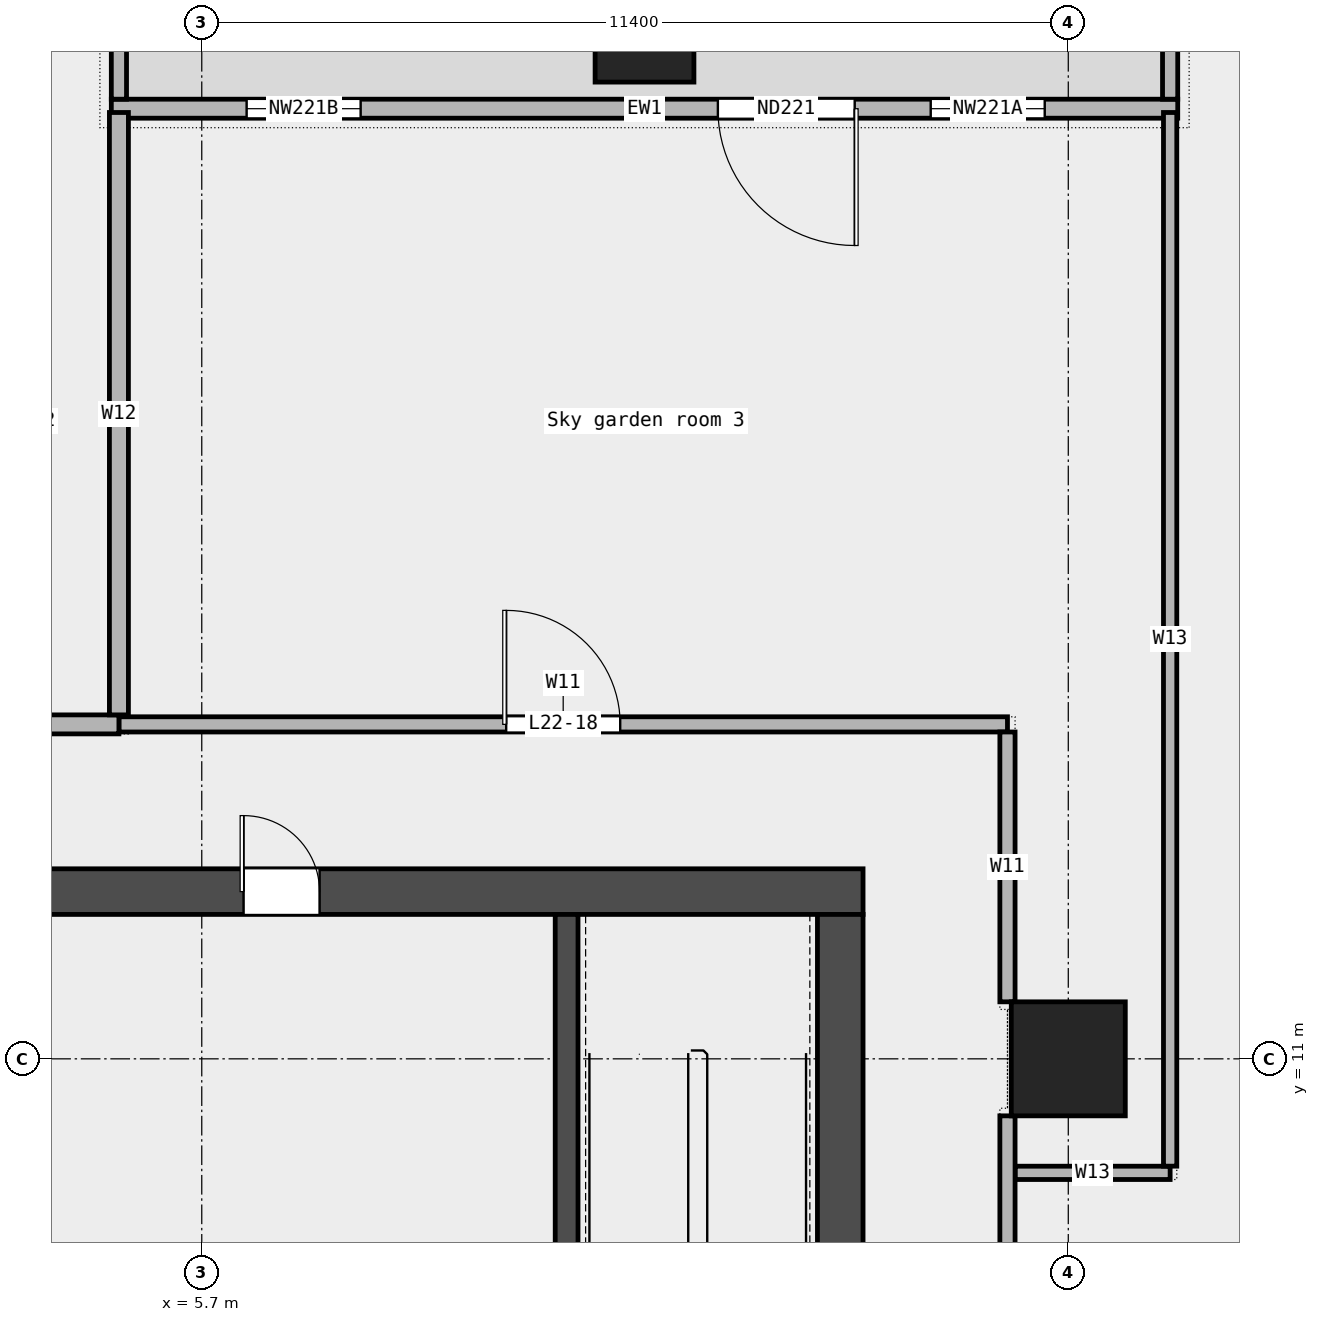
"""IFC4 building model, lengths in metres.
Left out: names, types, materials, properties, quantities, classifications, styles, units other than length and angle.
Written with IfcOpenShell. Run it as: python <this file> out.ifc"""

import sys

from ifc_helpers import new_model, si_unit, direction, frame, frame_2d, origin, origin_2d, place, context, subcontext, project, spatial, rectangle, extrude, element, fill, save


model = new_model("IFC4")
c1 = context("Model", 3, precision=1e-05, world=origin(), true_north=direction((0.0, 1.0)))
c2 = subcontext(c1, "Body", "Model", "MODEL_VIEW")
j1 = project(units=[si_unit("LENGTHUNIT", "METRE"), si_unit("PLANEANGLEUNIT", "RADIAN")], contexts=[c1])
p1 = place(None, origin())
s1 = spatial("IfcSite", under=j1, at=p1, CompositionType="ELEMENT")
p2 = place(p1, origin())
s2 = spatial("IfcBuilding", under=s1, at=p2, CompositionType="ELEMENT")
p3 = place(p2, frame((0.0, 0.0, 112.6)))
s3 = spatial("IfcBuildingStorey", under=s2, at=p3, CompositionType="ELEMENT", Elevation=112.6)
p4 = place(p3, frame((11.525, 24.5, 0.0), z_axis=(0.0, 0.0, 1.0), x_axis=(1.0, 0.0, 0.0)))
e1 = element("IfcColumn", 1, at=p4, inside=s3, PredefinedType="COLUMN", context=c2, shape_type="SweptSolid", body=[
    extrude(rectangle(XDim=1.3, YDim=1.3, at=origin_2d()), origin(), (0.0, 0.0, 1.0), 4.05),
])
p5 = place(p3, frame((17.1, 11.0, 0.0), z_axis=(0.0, 0.0, 1.0), x_axis=(1.0, 0.0, 0.0)))
e2 = element("IfcColumn", 2, at=p5, inside=s3, PredefinedType="COLUMN", context=c2, shape_type="SweptSolid", body=[
    extrude(rectangle(XDim=1.5, YDim=1.5, at=origin_2d()), origin(), (0.0, 0.0, 1.0), 4.05),
])
p6 = place(p3, frame((18.54, 23.5, 0.0), z_axis=(0.0, 0.0, 1.0), x_axis=(-1.0, 0.0, 0.0)))
e3 = element("IfcWall", 3, at=p6, inside=s3, PredefinedType="STANDARD", context=c2, shape_type="SweptSolid", body=[
    extrude(rectangle(XDim=14.03, YDim=0.25, at=frame_2d((7.015, 0.0))), origin(), (0.0, 0.0, 1.0), 4.05),
])
p7 = place(p6, frame((1.75, 0.0, 0.45)))
e4 = element("IfcOpeningElement", 4, at=p7, cuts=e3, PredefinedType="OPENING", context=c2, shape_type="SweptSolid", body=[
    extrude(rectangle(XDim=1.5, YDim=3.0, at=frame_2d((0.75, 1.5))), frame((0.0, 0.137, 0.0), z_axis=(0.0, -1.0, 0.0), x_axis=(1.0, 0.0, 0.0)), (0.0, 0.0, 1.0), 0.274),
])
p8 = place(p6, frame((4.25, 0.0, 0.0)))
e5 = element("IfcOpeningElement", 5, at=p8, cuts=e3, PredefinedType="OPENING", context=c2, shape_type="SweptSolid", body=[
    extrude(rectangle(XDim=1.8, YDim=2.4, at=frame_2d((0.9, 1.2))), frame((0.0, 0.137, 0.0), z_axis=(0.0, -1.0, 0.0), x_axis=(1.0, 0.0, 0.0)), (0.0, 0.0, 1.0), 0.274),
])
p9 = place(p6, frame((10.75, 0.0, 0.45)))
e6 = element("IfcOpeningElement", 6, at=p9, cuts=e3, PredefinedType="OPENING", context=c2, shape_type="SweptSolid", body=[
    extrude(rectangle(XDim=1.5, YDim=3.0, at=frame_2d((0.75, 1.5))), frame((0.0, 0.137, 0.0), z_axis=(0.0, -1.0, 0.0), x_axis=(1.0, 0.0, 0.0)), (0.0, 0.0, 1.0), 0.274),
])
for number, where, z_axis, x_axis in (
    (7, (18.44, 25.5, 0.0), (0.0, 0.0, 1.0), (0.0, -1.0, 0.0)),
    (8, (4.61, 25.5, 0.0), (0.0, 0.0, 1.0), (0.0, -1.0, 0.0)),
):
    element("IfcWall", number, at=place(p3, frame(where, z_axis=z_axis, x_axis=x_axis)), inside=s3, PredefinedType="STANDARD", context=c2, shape_type="SweptSolid", body=[
        extrude(rectangle(XDim=1.875, YDim=0.2, at=frame_2d((0.938, 0.0))), origin(), (0.0, 0.0, 1.0), 4.05),
    ])
p10 = place(p3, frame((16.4, 9.5, 0.0), z_axis=(0.0, 0.0, 1.0), x_axis=(1.0, 0.0, 0.0)))
e9 = element("IfcWall", 9, at=p10, inside=s3, PredefinedType="PARTITIONING", context=c2, shape_type="SweptSolid", body=[
    extrude(rectangle(XDim=2.04, YDim=0.175, at=frame_2d((1.02, 0.0))), origin(), (0.0, 0.0, 1.0), 4.05),
])
p11 = place(p3, frame((4.61, 15.4, 0.0), z_axis=(0.0, 0.0, 1.0), x_axis=(1.0, 0.0, 0.0)))
e10 = element("IfcWall", 10, at=p11, inside=s3, PredefinedType="PARTITIONING", context=c2, shape_type="SweptSolid", body=[
    extrude(rectangle(XDim=11.69, YDim=0.2, at=frame_2d((5.845, 0.0))), origin(), (0.0, 0.0, 1.0), 4.05),
])
p12 = place(p11, frame((5.095, 0.0, 0.0)))
e11 = element("IfcOpeningElement", 11, at=p12, cuts=e10, PredefinedType="OPENING", context=c2, shape_type="SweptSolid", body=[
    extrude(rectangle(XDim=1.5, YDim=2.1, at=frame_2d((0.75, 1.05))), frame((0.0, 0.112, 0.0), z_axis=(0.0, -1.0, 0.0), x_axis=(1.0, 0.0, 0.0)), (0.0, 0.0, 1.0), 0.224),
])
p13 = place(p3, frame((-1.515, 15.4, 0.0), z_axis=(0.0, 0.0, 1.0), x_axis=(1.0, 0.0, 0.0)))
e12 = element("IfcWall", 12, at=p13, inside=s3, PredefinedType="PARTITIONING", context=c2, shape_type="SweptSolid", body=[
    extrude(rectangle(XDim=6.125, YDim=0.25, at=frame_2d((3.062, 0.0))), origin(), (0.0, 0.0, 1.0), 4.05),
])
p14 = place(p13, frame((2.462, 0.0, 0.0)))
e13 = element("IfcOpeningElement", 13, at=p14, cuts=e12, PredefinedType="OPENING", context=c2, shape_type="SweptSolid", body=[
    extrude(rectangle(XDim=1.2, YDim=2.1, at=frame_2d((0.6, 1.05))), frame((0.0, 0.137, 0.0), z_axis=(0.0, -1.0, 0.0), x_axis=(1.0, 0.0, 0.0)), (0.0, 0.0, 1.0), 0.274),
])
p15 = place(p3, frame((4.61, 15.525, 0.0), z_axis=(0.0, 0.0, 1.0), x_axis=(0.0, 1.0, 0.0)))
e14 = element("IfcWall", 14, at=p15, inside=s3, PredefinedType="PARTITIONING", context=c2, shape_type="SweptSolid", body=[
    extrude(rectangle(XDim=7.925, YDim=0.25, at=frame_2d((3.962, 0.0))), origin(), (0.0, 0.0, 1.0), 4.05),
])
p16 = place(p3, frame((16.3, 1.325, 0.0), z_axis=(0.0, 0.0, 1.0), x_axis=(0.0, 1.0, 0.0)))
e15 = element("IfcWall", 15, at=p16, inside=s3, PredefinedType="PARTITIONING", context=c2, shape_type="SweptSolid", body=[
    extrude(rectangle(XDim=8.925, YDim=0.2, at=frame_2d((4.462, 0.0))), origin(), (0.0, 0.0, 1.0), 4.05),
])
p17 = place(p16, frame((3.188, 0.0, 0.0)))
e16 = element("IfcOpeningElement", 16, at=p17, cuts=e15, PredefinedType="OPENING", context=c2, shape_type="SweptSolid", body=[
    extrude(rectangle(XDim=1.8, YDim=2.1, at=frame_2d((0.9, 1.05))), frame((0.0, 0.112, 0.0), z_axis=(0.0, -1.0, 0.0), x_axis=(1.0, 0.0, 0.0)), (0.0, 0.0, 1.0), 0.224),
])
p18 = place(p3, frame((16.3, 11.75, 0.0), z_axis=(0.0, 0.0, 1.0), x_axis=(0.0, 1.0, 0.0)))
e17 = element("IfcWall", 17, at=p18, inside=s3, PredefinedType="PARTITIONING", context=c2, shape_type="SweptSolid", body=[
    extrude(rectangle(XDim=3.55, YDim=0.2, at=frame_2d((1.775, 0.0))), origin(), (0.0, 0.0, 1.0), 4.05),
])
p19 = place(p3, frame((18.44, 9.588, 0.0), z_axis=(0.0, 0.0, 1.0), x_axis=(0.0, 1.0, 0.0)))
e18 = element("IfcWall", 18, at=p19, inside=s3, PredefinedType="PARTITIONING", context=c2, shape_type="SweptSolid", body=[
    extrude(rectangle(XDim=13.862, YDim=0.175, at=frame_2d((6.931, 0.0))), origin(), (0.0, 0.0, 1.0), 4.05),
])
p20 = place(p3, frame((-14.4, 13.2, 0.0), z_axis=(0.0, 0.0, 1.0), x_axis=(1.0, 0.0, 0.0)))
e19 = element("IfcWall", 19, at=p20, inside=s3, PredefinedType="SHEAR", context=c2, shape_type="SweptSolid", body=[
    extrude(rectangle(XDim=28.8, YDim=0.6, at=frame_2d((14.4, 0.0))), origin(), (0.0, 0.0, 1.0), 4.2),
])
p21 = place(p20, frame((6.775, 0.0, 0.0)))
e20 = element("IfcOpeningElement", 20, at=p21, cuts=e19, PredefinedType="OPENING", context=c2, shape_type="SweptSolid", body=[
    extrude(rectangle(XDim=1.0, YDim=2.1, at=frame_2d((0.5, 1.05))), frame((0.0, 0.312, 0.0), z_axis=(0.0, -1.0, 0.0), x_axis=(1.0, 0.0, 0.0)), (0.0, 0.0, 1.0), 0.624),
])
p22 = place(p20, frame((13.525, 0.0, 0.0)))
e21 = element("IfcOpeningElement", 21, at=p22, cuts=e19, PredefinedType="OPENING", context=c2, shape_type="SweptSolid", body=[
    extrude(rectangle(XDim=1.0, YDim=2.1, at=frame_2d((0.5, 1.05))), frame((0.0, 0.312, 0.0), z_axis=(0.0, -1.0, 0.0), x_axis=(1.0, 0.0, 0.0)), (0.0, 0.0, 1.0), 0.624),
])
p23 = place(p20, frame((20.65, 0.0, 0.0)))
e22 = element("IfcOpeningElement", 22, at=p23, cuts=e19, PredefinedType="OPENING", context=c2, shape_type="SweptSolid", body=[
    extrude(rectangle(XDim=1.0, YDim=2.1, at=frame_2d((0.5, 1.05))), frame((0.0, 0.312, 0.0), z_axis=(0.0, -1.0, 0.0), x_axis=(1.0, 0.0, 0.0)), (0.0, 0.0, 1.0), 0.624),
])
p24 = place(p3, frame((14.1, -6.6, 0.0), z_axis=(0.0, 0.0, 1.0), x_axis=(0.0, 1.0, 0.0)))
e23 = element("IfcWall", 23, at=p24, inside=s3, PredefinedType="SHEAR", context=c2, shape_type="SweptSolid", body=[
    extrude(rectangle(XDim=19.5, YDim=0.6, at=frame_2d((9.75, 0.0))), origin(), (0.0, 0.0, 1.0), 4.2),
])
p25 = place(p24, frame((9.3, 0.0, 0.0)))
e24 = element("IfcOpeningElement", 24, at=p25, cuts=e23, PredefinedType="OPENING", context=c2, shape_type="SweptSolid", body=[
    extrude(rectangle(XDim=1.8, YDim=2.1, at=frame_2d((0.9, 1.05))), frame((0.0, 0.312, 0.0), z_axis=(0.0, -1.0, 0.0), x_axis=(1.0, 0.0, 0.0)), (0.0, 0.0, 1.0), 0.624),
])
p26 = place(p3, frame((10.5, 5.25, 0.0), z_axis=(0.0, 0.0, 1.0), x_axis=(0.0, 1.0, 0.0)))
e25 = element("IfcWall", 25, at=p26, inside=s3, PredefinedType="SHEAR", context=c2, shape_type="SweptSolid", body=[
    extrude(rectangle(XDim=7.65, YDim=0.3, at=frame_2d((3.825, 0.0))), origin(), (0.0, 0.0, 1.0), 4.2),
])
p27 = place(p7, origin())
e26 = element("IfcWindow", 26, at=p27, inside=s3, PartitioningType="SINGLE_PANEL", PredefinedType="WINDOW", context=c2, shape_type="SweptSolid", body=[
    extrude(rectangle(XDim=1.5, YDim=3.0, at=frame_2d((0.75, 1.5))), frame((0.0, 0.03, 0.0), z_axis=(0.0, -1.0, 0.0), x_axis=(1.0, 0.0, 0.0)), (0.0, 0.0, 1.0), 0.06),
])
fill(e4, e26)
p28 = place(p8, origin())
e27 = element("IfcDoor", 27, at=p28, inside=s3, OperationType="DOUBLE_DOOR_SINGLE_SWING", PredefinedType="DOOR", context=c2, shape_type="SweptSolid", body=[
    extrude(rectangle(XDim=1.8, YDim=2.4, at=frame_2d((0.9, 1.2))), frame((0.0, 0.025, 0.0), z_axis=(0.0, -1.0, 0.0), x_axis=(1.0, 0.0, 0.0)), (0.0, 0.0, 1.0), 0.05),
])
fill(e5, e27)
p29 = place(p9, origin())
e28 = element("IfcWindow", 28, at=p29, inside=s3, PartitioningType="SINGLE_PANEL", PredefinedType="WINDOW", context=c2, shape_type="SweptSolid", body=[
    extrude(rectangle(XDim=1.5, YDim=3.0, at=frame_2d((0.75, 1.5))), frame((0.0, 0.03, 0.0), z_axis=(0.0, -1.0, 0.0), x_axis=(1.0, 0.0, 0.0)), (0.0, 0.0, 1.0), 0.06),
])
fill(e6, e28)
p30 = place(p12, origin())
e29 = element("IfcDoor", 29, at=p30, inside=s3, OperationType="DOUBLE_DOOR_SINGLE_SWING", PredefinedType="DOOR", context=c2, shape_type="SweptSolid", body=[
    extrude(rectangle(XDim=1.5, YDim=2.1, at=frame_2d((0.75, 1.05))), frame((0.0, 0.025, 0.0), z_axis=(0.0, -1.0, 0.0), x_axis=(1.0, 0.0, 0.0)), (0.0, 0.0, 1.0), 0.05),
])
fill(e11, e29)
p31 = place(p23, origin())
e30 = element("IfcDoor", 30, at=p31, inside=s3, OperationType="SINGLE_SWING_LEFT", PredefinedType="DOOR", context=c2, shape_type="SweptSolid", body=[
    extrude(rectangle(XDim=1.0, YDim=2.1, at=frame_2d((0.5, 1.05))), frame((0.0, 0.025, 0.0), z_axis=(0.0, -1.0, 0.0), x_axis=(1.0, 0.0, 0.0)), (0.0, 0.0, 1.0), 0.05),
])
fill(e22, e30)
save(model, sys.argv[1])
